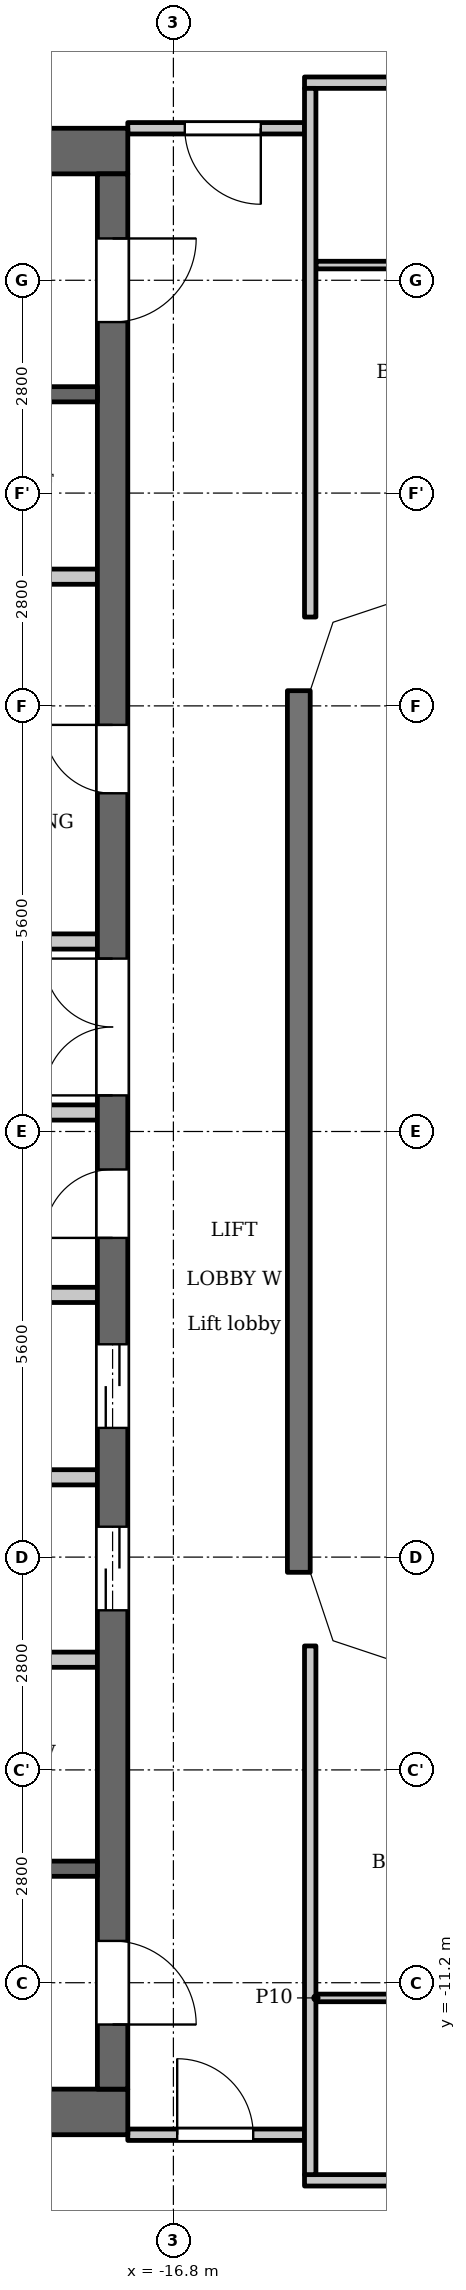
"""IFC4 building model, lengths in metres.
Left out: names, types, materials, properties, quantities, classifications, styles, units other than length and angle.
Written with IfcOpenShell. Run it as: python <this file> out.ifc"""

import sys

from ifc_helpers import new_model, si_unit, direction, frame, frame_2d, origin, place, context, subcontext, project, spatial, polyline, rectangle, outline, extrude, element, fill, save


model = new_model("IFC4")
c1 = context("Model", 3, precision=1e-05, world=origin(), true_north=direction((0.0, 1.0)))
c2 = subcontext(c1, "Body", "Model", "MODEL_VIEW")
j1 = project(units=[si_unit("LENGTHUNIT", "METRE"), si_unit("PLANEANGLEUNIT", "RADIAN")], contexts=[c1])
p1 = place(None, origin())
s1 = spatial("IfcSite", under=j1, at=p1, CompositionType="ELEMENT")
p2 = place(p1, origin())
s2 = spatial("IfcBuilding", under=s1, at=p2, CompositionType="ELEMENT")
p3 = place(p2, frame((0.0, 0.0, 273.2)))
s3 = spatial("IfcBuildingStorey", under=s2, at=p3, CompositionType="ELEMENT", Elevation=273.2)
p4 = place(p3, frame((-15.15, -5.8, 0.0), z_axis=(0.0, 0.0, 1.0), x_axis=(0.0, 1.0, 0.0)))
e1 = element("IfcWall", 1, at=p4, inside=s3, PredefinedType="SOLIDWALL", context=c2, shape_type="SweptSolid", body=[
    extrude(rectangle(XDim=11.6, YDim=0.3, at=frame_2d((5.8, 0.0))), origin(), (0.0, 0.0, 1.0), 3.2),
])
for number, where, z_axis, x_axis in (
    (2, (-17.4, 12.9, 0.0), (0.0, 0.0, 1.0), (-1.0, 0.0, 0.0)),
    (3, (-17.4, -12.9, 0.0), (0.0, 0.0, 1.0), (-1.0, 0.0, 0.0)),
):
    element("IfcWall", number, at=place(p3, frame(where, z_axis=z_axis, x_axis=x_axis)), inside=s3, PredefinedType="SHEAR", context=c2, shape_type="SweptSolid", body=[
        extrude(rectangle(XDim=7.32, YDim=0.6, at=frame_2d((3.66, 0.0))), origin(), (0.0, 0.0, 1.0), 3.2),
    ])
p5 = place(p3, frame((-17.6, -12.6, 0.0), z_axis=(0.0, 0.0, 1.0), x_axis=(0.0, 1.0, 0.0)))
e4 = element("IfcWall", 4, at=p5, inside=s3, PredefinedType="SHEAR", context=c2, shape_type="SweptSolid", body=[
    extrude(rectangle(XDim=25.2, YDim=0.4, at=frame_2d((12.6, 0.0))), origin(), (0.0, 0.0, 1.0), 3.2),
])
p6 = place(p5, frame((6.3, 0.0, 0.0)))
e5 = element("IfcOpeningElement", 5, at=p6, cuts=e4, PredefinedType="OPENING", context=c2, shape_type="SweptSolid", body=[
    extrude(rectangle(XDim=1.1, YDim=2.1, at=frame_2d((0.55, 1.05))), frame((0.0, 0.21, 0.0), z_axis=(0.0, -1.0, 0.0), x_axis=(1.0, 0.0, 0.0)), (0.0, 0.0, 1.0), 0.42),
])
p7 = place(p5, frame((8.7, 0.0, 0.0)))
e6 = element("IfcOpeningElement", 6, at=p7, cuts=e4, PredefinedType="OPENING", context=c2, shape_type="SweptSolid", body=[
    extrude(rectangle(XDim=1.1, YDim=2.1, at=frame_2d((0.55, 1.05))), frame((0.0, 0.21, 0.0), z_axis=(0.0, -1.0, 0.0), x_axis=(1.0, 0.0, 0.0)), (0.0, 0.0, 1.0), 0.42),
])
p8 = place(p5, frame((11.2, 0.0, 0.0)))
e7 = element("IfcOpeningElement", 7, at=p8, cuts=e4, PredefinedType="OPENING", context=c2, shape_type="SweptSolid", body=[
    extrude(rectangle(XDim=0.9, YDim=2.1, at=frame_2d((0.45, 1.05))), frame((0.0, 0.21, 0.0), z_axis=(0.0, -1.0, 0.0), x_axis=(1.0, 0.0, 0.0)), (0.0, 0.0, 1.0), 0.42),
])
p9 = place(p5, frame((17.05, 0.0, 0.0)))
e8 = element("IfcOpeningElement", 8, at=p9, cuts=e4, PredefinedType="OPENING", context=c2, shape_type="SweptSolid", body=[
    extrude(rectangle(XDim=0.9, YDim=2.1, at=frame_2d((0.45, 1.05))), frame((0.0, 0.21, 0.0), z_axis=(0.0, -1.0, 0.0), x_axis=(1.0, 0.0, 0.0)), (0.0, 0.0, 1.0), 0.42),
])
p10 = place(p5, frame((23.25, 0.0, 0.0)))
e9 = element("IfcOpeningElement", 9, at=p10, cuts=e4, PredefinedType="OPENING", context=c2, shape_type="SweptSolid", body=[
    extrude(rectangle(XDim=1.1, YDim=2.1, at=frame_2d((0.55, 1.05))), frame((0.0, 0.21, 0.0), z_axis=(0.0, -1.0, 0.0), x_axis=(1.0, 0.0, 0.0)), (0.0, 0.0, 1.0), 0.42),
])
p11 = place(p5, frame((0.85, 0.0, 0.0)))
e10 = element("IfcOpeningElement", 10, at=p11, cuts=e4, PredefinedType="OPENING", context=c2, shape_type="SweptSolid", body=[
    extrude(rectangle(XDim=1.1, YDim=2.1, at=frame_2d((0.55, 1.05))), frame((0.0, 0.21, 0.0), z_axis=(0.0, -1.0, 0.0), x_axis=(1.0, 0.0, 0.0)), (0.0, 0.0, 1.0), 0.42),
])
p12 = place(p5, frame((13.075, 0.0, 0.0)))
e11 = element("IfcOpeningElement", 11, at=p12, cuts=e4, PredefinedType="OPENING", context=c2, shape_type="SweptSolid", body=[
    extrude(rectangle(XDim=1.8, YDim=2.1, at=frame_2d((0.9, 1.05))), frame((0.0, 0.21, 0.0), z_axis=(0.0, -1.0, 0.0), x_axis=(1.0, 0.0, 0.0)), (0.0, 0.0, 1.0), 0.42),
])
p13 = place(p3, frame((-17.8, -9.7, 0.0), z_axis=(0.0, 0.0, 1.0), x_axis=(-1.0, 0.0, 0.0)))
e12 = element("IfcWall", 12, at=p13, inside=s3, PredefinedType="SHEAR", context=c2, shape_type="SweptSolid", body=[
    extrude(rectangle(XDim=5.8, YDim=0.2, at=frame_2d((2.9, 0.0))), origin(), (0.0, 0.0, 1.0), 3.2),
])
p14 = place(p13, frame((0.85, 0.0, 0.0)))
e13 = element("IfcOpeningElement", 13, at=p14, cuts=e12, PredefinedType="OPENING", context=c2, shape_type="SweptSolid", body=[
    extrude(rectangle(XDim=1.1, YDim=2.1, at=frame_2d((0.55, 1.05))), frame((0.0, 0.11, 0.0), z_axis=(0.0, -1.0, 0.0), x_axis=(1.0, 0.0, 0.0)), (0.0, 0.0, 1.0), 0.22),
])
p15 = place(p13, frame((3.75, 0.0, 0.0)))
e14 = element("IfcOpeningElement", 14, at=p15, cuts=e12, PredefinedType="OPENING", context=c2, shape_type="SweptSolid", body=[
    extrude(rectangle(XDim=1.1, YDim=2.1, at=frame_2d((0.55, 1.05))), frame((0.0, 0.11, 0.0), z_axis=(0.0, -1.0, 0.0), x_axis=(1.0, 0.0, 0.0)), (0.0, 0.0, 1.0), 0.22),
])
for number, where, z_axis, x_axis in (
    (15, (-17.8, -6.95, 0.0), (0.0, 0.0, 1.0), (-1.0, 0.0, 0.0)),
    (16, (-17.8, -4.55, 0.0), (0.0, 0.0, 1.0), (-1.0, 0.0, 0.0)),
    (17, (-17.8, -2.15, 0.0), (0.0, 0.0, 1.0), (-1.0, 0.0, 0.0)),
):
    element("IfcWall", number, at=place(p3, frame(where, z_axis=z_axis, x_axis=x_axis)), inside=s3, PredefinedType="PARTITIONING", context=c2, shape_type="SweptSolid", body=[
        extrude(rectangle(XDim=2.8, YDim=0.2, at=frame_2d((1.4, 0.0))), origin(), (0.0, 0.0, 1.0), 3.2),
    ])
for number, where, z_axis, x_axis in (
    (18, (-17.8, 0.25, 0.0), (0.0, 0.0, 1.0), (-1.0, 0.0, 0.0)),
    (19, (-17.8, 2.5, 0.0), (0.0, 0.0, 1.0), (-1.0, 0.0, 0.0)),
):
    element("IfcWall", number, at=place(p3, frame(where, z_axis=z_axis, x_axis=x_axis)), inside=s3, PredefinedType="PARTITIONING", context=c2, shape_type="SweptSolid", body=[
        extrude(rectangle(XDim=3.0, YDim=0.2, at=frame_2d((1.5, 0.0))), origin(), (0.0, 0.0, 1.0), 3.2),
    ])
p16 = place(p3, frame((-17.8, 7.3, 0.0), z_axis=(0.0, 0.0, 1.0), x_axis=(-1.0, 0.0, 0.0)))
e20 = element("IfcWall", 20, at=p16, inside=s3, PredefinedType="PARTITIONING", context=c2, shape_type="SweptSolid", body=[
    extrude(rectangle(XDim=2.8, YDim=0.2, at=frame_2d((1.4, 0.0))), origin(), (0.0, 0.0, 1.0), 3.2),
])
p17 = place(p3, frame((-17.8, 9.7, 0.0), z_axis=(0.0, 0.0, 1.0), x_axis=(-1.0, 0.0, 0.0)))
e21 = element("IfcWall", 21, at=p17, inside=s3, PredefinedType="SHEAR", context=c2, shape_type="SweptSolid", body=[
    extrude(rectangle(XDim=5.8, YDim=0.2, at=frame_2d((2.9, 0.0))), origin(), (0.0, 0.0, 1.0), 3.2),
])
p18 = place(p17, frame((0.85, 0.0, 0.0)))
e22 = element("IfcOpeningElement", 22, at=p18, cuts=e21, PredefinedType="OPENING", context=c2, shape_type="SweptSolid", body=[
    extrude(rectangle(XDim=1.1, YDim=2.1, at=frame_2d((0.55, 1.05))), frame((0.0, 0.11, 0.0), z_axis=(0.0, -1.0, 0.0), x_axis=(1.0, 0.0, 0.0)), (0.0, 0.0, 1.0), 0.22),
])
p19 = place(p17, frame((3.75, 0.0, 0.0)))
e23 = element("IfcOpeningElement", 23, at=p19, cuts=e21, PredefinedType="OPENING", context=c2, shape_type="SweptSolid", body=[
    extrude(rectangle(XDim=1.1, YDim=2.1, at=frame_2d((0.55, 1.05))), frame((0.0, 0.11, 0.0), z_axis=(0.0, -1.0, 0.0), x_axis=(1.0, 0.0, 0.0)), (0.0, 0.0, 1.0), 0.22),
])
p20 = place(p3, frame((-15.075, -13.8, 0.0), z_axis=(0.0, 0.0, 1.0), x_axis=(1.0, 0.0, 0.0)))
e24 = element("IfcWall", 24, at=p20, inside=s3, PredefinedType="PARTITIONING", context=c2, shape_type="SweptSolid", body=[
    extrude(rectangle(XDim=30.15, YDim=0.15, at=frame_2d((15.075, 0.0))), origin(), (0.0, 0.0, 1.0), 3.2),
])
p21 = place(p20, frame((10.175, 0.0, 0.0)))
e25 = element("IfcOpeningElement", 25, at=p21, cuts=e24, PredefinedType="OPENING", context=c2, shape_type="SweptSolid", body=[
    extrude(rectangle(XDim=1.0, YDim=2.1, at=frame_2d((0.5, 1.05))), frame((0.0, 0.085, 0.0), z_axis=(0.0, -1.0, 0.0), x_axis=(1.0, 0.0, 0.0)), (0.0, 0.0, 1.0), 0.17),
])
p22 = place(p20, frame((15.775, 0.0, 0.0)))
e26 = element("IfcOpeningElement", 26, at=p22, cuts=e24, PredefinedType="OPENING", context=c2, shape_type="SweptSolid", body=[
    extrude(rectangle(XDim=1.0, YDim=2.1, at=frame_2d((0.5, 1.05))), frame((0.0, 0.085, 0.0), z_axis=(0.0, -1.0, 0.0), x_axis=(1.0, 0.0, 0.0)), (0.0, 0.0, 1.0), 0.17),
])
p23 = place(p3, frame((-17.4, -13.2, 0.0), z_axis=(0.0, 0.0, 1.0), x_axis=(1.0, 0.0, 0.0)))
e27 = element("IfcWall", 27, at=p23, inside=s3, PredefinedType="PARTITIONING", context=c2, shape_type="SweptSolid", body=[
    extrude(rectangle(XDim=2.325, YDim=0.15, at=frame_2d((1.163, 0.0))), origin(), (0.0, 0.0, 1.0), 3.2),
])
p24 = place(p23, frame((0.65, 0.0, 0.0)))
e28 = element("IfcOpeningElement", 28, at=p24, cuts=e27, PredefinedType="OPENING", context=c2, shape_type="SweptSolid", body=[
    extrude(rectangle(XDim=1.0, YDim=2.1, at=frame_2d((0.5, 1.05))), frame((0.0, 0.085, 0.0), z_axis=(0.0, -1.0, 0.0), x_axis=(1.0, 0.0, 0.0)), (0.0, 0.0, 1.0), 0.17),
])
p25 = place(p3, frame((-14.925, -11.4, 0.0), z_axis=(0.0, 0.0, 1.0), x_axis=(1.0, 0.0, 0.0)))
e29 = element("IfcWall", 29, at=p25, inside=s3, PredefinedType="PARTITIONING", context=c2, shape_type="SweptSolid", body=[
    extrude(rectangle(XDim=29.85, YDim=0.1, at=frame_2d((14.925, 0.0))), origin(), (0.0, 0.0, 1.0), 3.2),
])
p26 = place(p25, frame((13.375, 0.0, 0.0)))
e30 = element("IfcOpeningElement", 30, at=p26, cuts=e29, PredefinedType="OPENING", context=c2, shape_type="SweptSolid", body=[
    extrude(rectangle(XDim=0.9, YDim=2.1, at=frame_2d((0.45, 1.05))), frame((0.0, 0.06, 0.0), z_axis=(0.0, -1.0, 0.0), x_axis=(1.0, 0.0, 0.0)), (0.0, 0.0, 1.0), 0.12),
])
p27 = place(p25, frame((4.775, 0.0, 0.0)))
e31 = element("IfcOpeningElement", 31, at=p27, cuts=e29, PredefinedType="OPENING", context=c2, shape_type="SweptSolid", body=[
    extrude(rectangle(XDim=0.9, YDim=2.1, at=frame_2d((0.45, 1.05))), frame((0.0, 0.06, 0.0), z_axis=(0.0, -1.0, 0.0), x_axis=(1.0, 0.0, 0.0)), (0.0, 0.0, 1.0), 0.12),
])
p28 = place(p25, frame((18.475, 0.0, 0.0)))
e32 = element("IfcOpeningElement", 32, at=p28, cuts=e29, PredefinedType="OPENING", context=c2, shape_type="SweptSolid", body=[
    extrude(rectangle(XDim=0.9, YDim=2.1, at=frame_2d((0.45, 1.05))), frame((0.0, 0.06, 0.0), z_axis=(0.0, -1.0, 0.0), x_axis=(1.0, 0.0, 0.0)), (0.0, 0.0, 1.0), 0.12),
])
p29 = place(p25, frame((21.825, 0.0, 0.0)))
e33 = element("IfcOpeningElement", 33, at=p29, cuts=e29, PredefinedType="OPENING", context=c2, shape_type="SweptSolid", body=[
    extrude(rectangle(XDim=0.9, YDim=2.1, at=frame_2d((0.45, 1.05))), frame((0.0, 0.06, 0.0), z_axis=(0.0, -1.0, 0.0), x_axis=(1.0, 0.0, 0.0)), (0.0, 0.0, 1.0), 0.12),
])
p30 = place(p3, frame((-14.925, 11.4, 0.0), z_axis=(0.0, 0.0, 1.0), x_axis=(1.0, 0.0, 0.0)))
e34 = element("IfcWall", 34, at=p30, inside=s3, PredefinedType="PARTITIONING", context=c2, shape_type="SweptSolid", body=[
    extrude(rectangle(XDim=29.85, YDim=0.1, at=frame_2d((14.925, 0.0))), origin(), (0.0, 0.0, 1.0), 3.2),
])
p31 = place(p30, frame((13.475, 0.0, 0.0)))
e35 = element("IfcOpeningElement", 35, at=p31, cuts=e34, PredefinedType="OPENING", context=c2, shape_type="SweptSolid", body=[
    extrude(rectangle(XDim=0.9, YDim=2.1, at=frame_2d((0.45, 1.05))), frame((0.0, 0.06, 0.0), z_axis=(0.0, -1.0, 0.0), x_axis=(1.0, 0.0, 0.0)), (0.0, 0.0, 1.0), 0.12),
])
p32 = place(p30, frame((4.625, 0.0, 0.0)))
e36 = element("IfcOpeningElement", 36, at=p32, cuts=e34, PredefinedType="OPENING", context=c2, shape_type="SweptSolid", body=[
    extrude(rectangle(XDim=0.9, YDim=2.1, at=frame_2d((0.45, 1.05))), frame((0.0, 0.06, 0.0), z_axis=(0.0, -1.0, 0.0), x_axis=(1.0, 0.0, 0.0)), (0.0, 0.0, 1.0), 0.12),
])
p33 = place(p30, frame((18.075, 0.0, 0.0)))
e37 = element("IfcOpeningElement", 37, at=p33, cuts=e34, PredefinedType="OPENING", context=c2, shape_type="SweptSolid", body=[
    extrude(rectangle(XDim=0.8, YDim=2.1, at=frame_2d((0.4, 1.05))), frame((0.0, 0.06, 0.0), z_axis=(0.0, -1.0, 0.0), x_axis=(1.0, 0.0, 0.0)), (0.0, 0.0, 1.0), 0.12),
])
p34 = place(p30, frame((15.575, 0.0, 0.0)))
e38 = element("IfcOpeningElement", 38, at=p34, cuts=e34, PredefinedType="OPENING", context=c2, shape_type="SweptSolid", body=[
    extrude(rectangle(XDim=0.9, YDim=2.1, at=frame_2d((0.45, 1.05))), frame((0.0, 0.06, 0.0), z_axis=(0.0, -1.0, 0.0), x_axis=(1.0, 0.0, 0.0)), (0.0, 0.0, 1.0), 0.12),
])
p35 = place(p30, frame((28.474, 0.0, 0.0)))
e39 = element("IfcOpeningElement", 39, at=p35, cuts=e34, PredefinedType="OPENING", context=c2, shape_type="SweptSolid", body=[
    extrude(rectangle(XDim=0.8, YDim=2.1, at=frame_2d((0.4, 1.05))), frame((0.0, 0.06, 0.0), z_axis=(0.0, -1.0, 0.0), x_axis=(1.0, 0.0, 0.0)), (0.0, 0.0, 1.0), 0.12),
])
p36 = place(p30, frame((23.425, 0.0, 0.0)))
e40 = element("IfcOpeningElement", 40, at=p36, cuts=e34, PredefinedType="OPENING", context=c2, shape_type="SweptSolid", body=[
    extrude(rectangle(XDim=0.9, YDim=2.1, at=frame_2d((0.45, 1.05))), frame((0.0, 0.06, 0.0), z_axis=(0.0, -1.0, 0.0), x_axis=(1.0, 0.0, 0.0)), (0.0, 0.0, 1.0), 0.12),
])
p37 = place(p3, frame((-17.4, 13.2, 0.0), z_axis=(0.0, 0.0, 1.0), x_axis=(1.0, 0.0, 0.0)))
e41 = element("IfcWall", 41, at=p37, inside=s3, PredefinedType="PARTITIONING", context=c2, shape_type="SweptSolid", body=[
    extrude(rectangle(XDim=2.325, YDim=0.15, at=frame_2d((1.163, 0.0))), origin(), (0.0, 0.0, 1.0), 3.2),
])
p38 = place(p37, frame((0.75, 0.0, 0.0)))
e42 = element("IfcOpeningElement", 42, at=p38, cuts=e41, PredefinedType="OPENING", context=c2, shape_type="SweptSolid", body=[
    extrude(rectangle(XDim=1.0, YDim=2.1, at=frame_2d((0.5, 1.05))), frame((0.0, 0.085, 0.0), z_axis=(0.0, -1.0, 0.0), x_axis=(1.0, 0.0, 0.0)), (0.0, 0.0, 1.0), 0.17),
])
p39 = place(p3, frame((-15.075, 13.8, 0.0), z_axis=(0.0, 0.0, 1.0), x_axis=(1.0, 0.0, 0.0)))
e43 = element("IfcWall", 43, at=p39, inside=s3, PredefinedType="PARTITIONING", context=c2, shape_type="SweptSolid", body=[
    extrude(rectangle(XDim=30.15, YDim=0.15, at=frame_2d((15.075, 0.0))), origin(), (0.0, 0.0, 1.0), 3.2),
])
p40 = place(p39, frame((10.125, 0.0, 0.0)))
e44 = element("IfcOpeningElement", 44, at=p40, cuts=e43, PredefinedType="OPENING", context=c2, shape_type="SweptSolid", body=[
    extrude(rectangle(XDim=1.0, YDim=2.1, at=frame_2d((0.5, 1.05))), frame((0.0, 0.085, 0.0), z_axis=(0.0, -1.0, 0.0), x_axis=(1.0, 0.0, 0.0)), (0.0, 0.0, 1.0), 0.17),
])
p41 = place(p39, frame((15.725, 0.0, 0.0)))
e45 = element("IfcOpeningElement", 45, at=p41, cuts=e43, PredefinedType="OPENING", context=c2, shape_type="SweptSolid", body=[
    extrude(rectangle(XDim=1.0, YDim=2.1, at=frame_2d((0.5, 1.05))), frame((0.0, 0.085, 0.0), z_axis=(0.0, -1.0, 0.0), x_axis=(1.0, 0.0, 0.0)), (0.0, 0.0, 1.0), 0.17),
])
p42 = place(p39, frame((24.575, 0.0, 0.0)))
e46 = element("IfcOpeningElement", 46, at=p42, cuts=e43, PredefinedType="OPENING", context=c2, shape_type="SweptSolid", body=[
    extrude(rectangle(XDim=1.0, YDim=2.1, at=frame_2d((0.5, 1.05))), frame((0.0, 0.085, 0.0), z_axis=(0.0, -1.0, 0.0), x_axis=(1.0, 0.0, 0.0)), (0.0, 0.0, 1.0), 0.17),
])
for number, where, z_axis, x_axis in (
    (47, (-15.0, -13.725, 0.0), (0.0, 0.0, 1.0), (0.0, 1.0, 0.0)),
    (48, (-15.0, 6.769, 0.0), (0.0, 0.0, 1.0), (0.0, 1.0, 0.0)),
):
    element("IfcWall", number, at=place(p3, frame(where, z_axis=z_axis, x_axis=x_axis)), inside=s3, PredefinedType="PARTITIONING", context=c2, shape_type="SweptSolid", body=[
        extrude(rectangle(XDim=6.956, YDim=0.15, at=frame_2d((3.478, 0.0))), origin(), (0.0, 0.0, 1.0), 3.2),
    ])
p43 = place(p3, origin())
e49 = element("IfcWall", 49, at=p43, inside=s3, PredefinedType="SOLIDWALL", context=c2, shape_type="SweptSolid", body=[
    extrude(outline(polyline([(-13.849, 7.3), (-14.937, 6.937), (-15.3, 5.849), (-15.3, 5.8), (-15.0, 5.8), (-14.7, 6.7), (-13.8, 7.0), (-13.8, 7.3), (-13.849, 7.3)])), origin(), (0.0, 0.0, 1.0), 3.2),
])
e50 = element("IfcWall", 50, at=p43, inside=s3, PredefinedType="SOLIDWALL", context=c2, shape_type="SweptSolid", body=[
    extrude(outline(polyline([(-14.937, -6.937), (-13.849, -7.3), (-13.8, -7.3), (-13.8, -7.0), (-14.7, -6.7), (-15.0, -5.8), (-15.3, -5.8), (-15.3, -5.849), (-14.937, -6.937)])), origin(), (0.0, 0.0, 1.0), 3.2),
])
p44 = place(p6, origin())
e51 = element("IfcDoor", 51, at=p44, inside=s3, OperationType="DOUBLE_DOOR_SLIDING", PredefinedType="DOOR", context=c2, shape_type="SweptSolid", body=[
    extrude(rectangle(XDim=1.1, YDim=2.1, at=frame_2d((0.55, 1.05))), frame((0.0, 0.025, 0.0), z_axis=(0.0, -1.0, 0.0), x_axis=(1.0, 0.0, 0.0)), (0.0, 0.0, 1.0), 0.05),
])
fill(e5, e51)
p45 = place(p7, origin())
e52 = element("IfcDoor", 52, at=p45, inside=s3, OperationType="DOUBLE_DOOR_SLIDING", PredefinedType="DOOR", context=c2, shape_type="SweptSolid", body=[
    extrude(rectangle(XDim=1.1, YDim=2.1, at=frame_2d((0.55, 1.05))), frame((0.0, 0.025, 0.0), z_axis=(0.0, -1.0, 0.0), x_axis=(1.0, 0.0, 0.0)), (0.0, 0.0, 1.0), 0.05),
])
fill(e6, e52)
p46 = place(p8, origin())
e53 = element("IfcDoor", 53, at=p46, inside=s3, OperationType="SINGLE_SWING_RIGHT", PredefinedType="DOOR", context=c2, shape_type="SweptSolid", body=[
    extrude(rectangle(XDim=0.9, YDim=2.1, at=frame_2d((0.45, 1.05))), frame((0.0, 0.025, 0.0), z_axis=(0.0, -1.0, 0.0), x_axis=(1.0, 0.0, 0.0)), (0.0, 0.0, 1.0), 0.05),
])
fill(e7, e53)
p47 = place(p9, origin())
e54 = element("IfcDoor", 54, at=p47, inside=s3, OperationType="SINGLE_SWING_LEFT", PredefinedType="DOOR", context=c2, shape_type="SweptSolid", body=[
    extrude(rectangle(XDim=0.9, YDim=2.1, at=frame_2d((0.45, 1.05))), frame((0.0, 0.025, 0.0), z_axis=(0.0, -1.0, 0.0), x_axis=(1.0, 0.0, 0.0)), (0.0, 0.0, 1.0), 0.05),
])
fill(e8, e54)
p48 = place(p10, origin())
e55 = element("IfcDoor", 55, at=p48, inside=s3, OperationType="SINGLE_SWING_RIGHT", PredefinedType="DOOR", context=c2, shape_type="SweptSolid", body=[
    extrude(rectangle(XDim=1.1, YDim=2.1, at=frame_2d((0.55, 1.05))), frame((0.0, 0.025, 0.0), z_axis=(0.0, -1.0, 0.0), x_axis=(1.0, 0.0, 0.0)), (0.0, 0.0, 1.0), 0.05),
])
fill(e9, e55)
p49 = place(p11, origin())
e56 = element("IfcDoor", 56, at=p49, inside=s3, OperationType="SINGLE_SWING_LEFT", PredefinedType="DOOR", context=c2, shape_type="SweptSolid", body=[
    extrude(rectangle(XDim=1.1, YDim=2.1, at=frame_2d((0.55, 1.05))), frame((0.0, 0.025, 0.0), z_axis=(0.0, -1.0, 0.0), x_axis=(1.0, 0.0, 0.0)), (0.0, 0.0, 1.0), 0.05),
])
fill(e10, e56)
p50 = place(p12, origin())
e57 = element("IfcDoor", 57, at=p50, inside=s3, OperationType="DOUBLE_DOOR_SINGLE_SWING", PredefinedType="DOOR", context=c2, shape_type="SweptSolid", body=[
    extrude(rectangle(XDim=1.8, YDim=2.1, at=frame_2d((0.9, 1.05))), frame((0.0, 0.025, 0.0), z_axis=(0.0, -1.0, 0.0), x_axis=(1.0, 0.0, 0.0)), (0.0, 0.0, 1.0), 0.05),
])
fill(e11, e57)
p51 = place(p38, origin())
e58 = element("IfcDoor", 58, at=p51, inside=s3, OperationType="SINGLE_SWING_RIGHT", PredefinedType="DOOR", context=c2, shape_type="SweptSolid", body=[
    extrude(rectangle(XDim=1.0, YDim=2.1, at=frame_2d((0.5, 1.05))), frame((0.0, 0.025, 0.0), z_axis=(0.0, -1.0, 0.0), x_axis=(1.0, 0.0, 0.0)), (0.0, 0.0, 1.0), 0.05),
])
fill(e42, e58)
p52 = place(p24, origin())
e59 = element("IfcDoor", 59, at=p52, inside=s3, OperationType="SINGLE_SWING_RIGHT", PredefinedType="DOOR", context=c2, shape_type="SweptSolid", body=[
    extrude(rectangle(XDim=1.0, YDim=2.1, at=frame_2d((0.5, 1.05))), frame((0.0, 0.025, 0.0), z_axis=(0.0, -1.0, 0.0), x_axis=(1.0, 0.0, 0.0)), (0.0, 0.0, 1.0), 0.05),
])
fill(e28, e59)
save(model, sys.argv[1])
